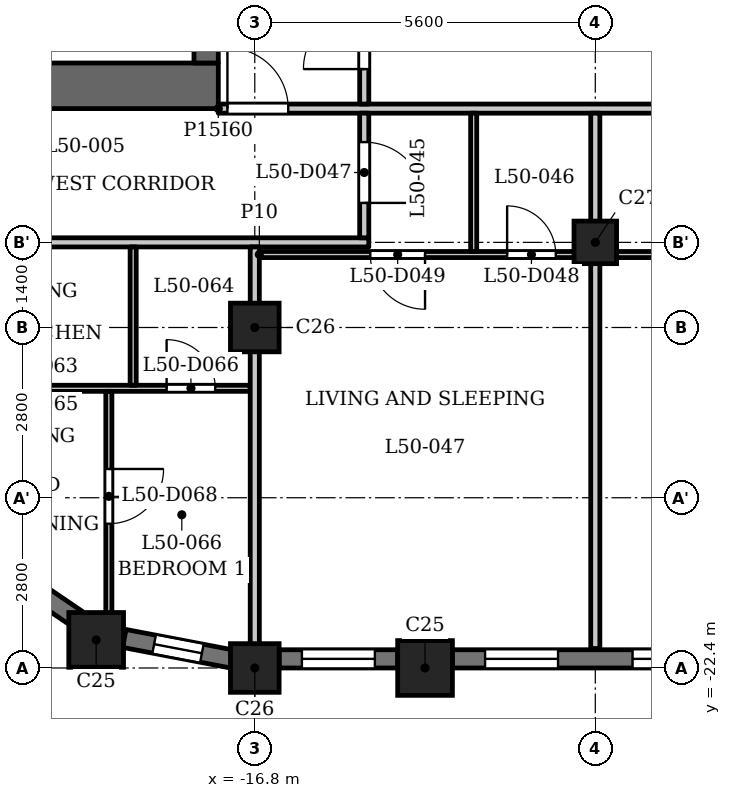
"""IFC4 building model, lengths in metres.
Left out: names, types, materials, properties, quantities, classifications, styles, units other than length and angle.
Written with IfcOpenShell. Run it as: python <this file> out.ifc"""

import sys

from ifc_helpers import new_model, si_unit, direction, frame, frame_2d, origin, origin_2d, place, context, subcontext, project, spatial, rectangle, extrude, element, fill, save


model = new_model("IFC4")
c1 = context("Model", 3, precision=1e-05, world=origin(), true_north=direction((0.0, 1.0)))
c2 = subcontext(c1, "Body", "Model", "MODEL_VIEW")
j1 = project(units=[si_unit("LENGTHUNIT", "METRE"), si_unit("PLANEANGLEUNIT", "RADIAN")], contexts=[c1])
p1 = place(None, origin())
s1 = spatial("IfcSite", under=j1, at=p1, CompositionType="ELEMENT")
p2 = place(p1, origin())
s2 = spatial("IfcBuilding", under=s1, at=p2, CompositionType="ELEMENT")
p3 = place(p2, frame((0.0, 0.0, 195.9)))
s3 = spatial("IfcBuildingStorey", under=s2, at=p3, CompositionType="ELEMENT", Elevation=195.9)
for number, where, z_axis, x_axis in (
    (1, (-19.409, -21.938, 0.0), (0.0, 0.0, 1.0), (1.0, 0.0, 0.0)),
    (2, (-14.0, -22.4, 0.0), (0.0, 0.0, 1.0), (1.0, 0.0, 0.0)),
):
    element("IfcColumn", number, at=place(p3, frame(where, z_axis=z_axis, x_axis=x_axis)), inside=s3, PredefinedType="COLUMN", context=c2, shape_type="SweptSolid", body=[
        extrude(rectangle(XDim=0.9, YDim=0.9, at=origin_2d()), origin(), (0.0, 0.0, 1.0), 3.5),
    ])
for number, where, z_axis, x_axis in (
    (3, (-16.8, -22.4, 0.0), (0.0, 0.0, 1.0), (1.0, 0.0, 0.0)),
    (4, (-16.8, -16.8, 0.0), (0.0, 0.0, 1.0), (1.0, 0.0, 0.0)),
):
    element("IfcColumn", number, at=place(p3, frame(where, z_axis=z_axis, x_axis=x_axis)), inside=s3, PredefinedType="COLUMN", context=c2, shape_type="SweptSolid", body=[
        extrude(rectangle(XDim=0.8, YDim=0.8, at=origin_2d()), origin(), (0.0, 0.0, 1.0), 3.5),
    ])
p4 = place(p3, frame((-11.2, -15.4, 0.0), z_axis=(0.0, 0.0, 1.0), x_axis=(1.0, 0.0, 0.0)))
e5 = element("IfcColumn", 5, at=p4, inside=s3, PredefinedType="COLUMN", context=c2, shape_type="SweptSolid", body=[
    extrude(rectangle(XDim=0.7, YDim=0.7, at=origin_2d()), origin(), (0.0, 0.0, 1.0), 3.5),
])
p5 = place(p3, frame((-20.775, -20.876, 0.0), z_axis=(0.0, 0.0, 1.0), x_axis=(0.827075824828, -0.562090366388, 0.0)))
e6 = element("IfcWall", 6, at=p5, inside=s3, PredefinedType="SOLIDWALL", context=c2, shape_type="SweptSolid", body=[
    extrude(rectangle(XDim=1.277, YDim=0.3, at=frame_2d((0.638, 0.0))), origin(), (0.0, 0.0, 1.0), 2.5),
])
p6 = place(p3, frame((-18.946, -21.914, 0.0), z_axis=(0.0, 0.0, 1.0), x_axis=(0.98230529033, -0.187286722942, 0.0)))
e7 = element("IfcWall", 7, at=p6, inside=s3, PredefinedType="SOLIDWALL", context=c2, shape_type="SweptSolid", body=[
    extrude(rectangle(XDim=1.799, YDim=0.3, at=frame_2d((0.899, 0.0))), origin(), (0.0, 0.0, 1.0), 2.5),
])
p7 = place(p6, frame((0.5, 0.0, 0.6)))
e8 = element("IfcOpeningElement", 8, at=p7, cuts=e7, PredefinedType="OPENING", context=c2, shape_type="SweptSolid", body=[
    extrude(rectangle(XDim=0.8, YDim=1.55, at=frame_2d((0.4, 0.775))), frame((0.0, 0.16, 0.0), z_axis=(0.0, -1.0, 0.0), x_axis=(1.0, 0.0, 0.0)), (0.0, 0.0, 1.0), 0.32),
])
p8 = place(p3, frame((-16.4, -22.25, 0.0), z_axis=(0.0, 0.0, 1.0), x_axis=(1.0, 0.0, 0.0)))
e9 = element("IfcWall", 9, at=p8, inside=s3, PredefinedType="SOLIDWALL", context=c2, shape_type="SweptSolid", body=[
    extrude(rectangle(XDim=1.95, YDim=0.3, at=frame_2d((0.975, 0.0))), origin(), (0.0, 0.0, 1.0), 2.5),
])
p9 = place(p8, frame((0.375, 0.0, 0.6)))
e10 = element("IfcOpeningElement", 10, at=p9, cuts=e9, PredefinedType="OPENING", context=c2, shape_type="SweptSolid", body=[
    extrude(rectangle(XDim=1.2, YDim=1.55, at=frame_2d((0.6, 0.775))), frame((0.0, 0.16, 0.0), z_axis=(0.0, -1.0, 0.0), x_axis=(1.0, 0.0, 0.0)), (0.0, 0.0, 1.0), 0.32),
])
p10 = place(p3, frame((-13.55, -22.25, 0.0), z_axis=(0.0, 0.0, 1.0), x_axis=(1.0, 0.0, 0.0)))
e11 = element("IfcWall", 11, at=p10, inside=s3, PredefinedType="SOLIDWALL", context=c2, shape_type="SweptSolid", body=[
    extrude(rectangle(XDim=4.7, YDim=0.3, at=frame_2d((2.35, 0.0))), origin(), (0.0, 0.0, 1.0), 2.5),
])
p11 = place(p10, frame((0.538, 0.0, 0.6)))
e12 = element("IfcOpeningElement", 12, at=p11, cuts=e11, PredefinedType="OPENING", context=c2, shape_type="SweptSolid", body=[
    extrude(rectangle(XDim=1.2, YDim=1.55, at=frame_2d((0.6, 0.775))), frame((0.0, 0.16, 0.0), z_axis=(0.0, -1.0, 0.0), x_axis=(1.0, 0.0, 0.0)), (0.0, 0.0, 1.0), 0.32),
])
p12 = place(p10, frame((2.962, 0.0, 0.6)))
e13 = element("IfcOpeningElement", 13, at=p12, cuts=e11, PredefinedType="OPENING", context=c2, shape_type="SweptSolid", body=[
    extrude(rectangle(XDim=1.2, YDim=1.55, at=frame_2d((0.6, 0.775))), frame((0.0, 0.16, 0.0), z_axis=(0.0, -1.0, 0.0), x_axis=(1.0, 0.0, 0.0)), (0.0, 0.0, 1.0), 0.32),
])
p13 = place(p3, frame((-17.4, -12.825, 0.0), z_axis=(0.0, 0.0, 1.0), x_axis=(-1.0, 0.0, 0.0)))
e14 = element("IfcWall", 14, at=p13, inside=s3, PredefinedType="SHEAR", context=c2, shape_type="SweptSolid", body=[
    extrude(rectangle(XDim=7.6, YDim=0.75, at=frame_2d((3.8, 0.0))), origin(), (0.0, 0.0, 1.0), 3.2),
])
p14 = place(p3, frame((-17.6, -12.45, 0.0), z_axis=(0.0, 0.0, 1.0), x_axis=(0.0, 1.0, 0.0)))
e15 = element("IfcWall", 15, at=p14, inside=s3, PredefinedType="SHEAR", context=c2, shape_type="SweptSolid", body=[
    extrude(rectangle(XDim=24.9, YDim=0.4, at=frame_2d((12.45, 0.0))), origin(), (0.0, 0.0, 1.0), 3.2),
])
p15 = place(p14, frame((6.325, 0.0, 0.0)))
e16 = element("IfcOpeningElement", 16, at=p15, cuts=e15, PredefinedType="OPENING", context=c2, shape_type="SweptSolid", body=[
    extrude(rectangle(XDim=0.9, YDim=2.1, at=frame_2d((0.45, 1.05))), frame((0.0, 0.21, 0.0), z_axis=(0.0, -1.0, 0.0), x_axis=(1.0, 0.0, 0.0)), (0.0, 0.0, 1.0), 0.42),
])
p16 = place(p14, frame((9.925, 0.0, 0.0)))
e17 = element("IfcOpeningElement", 17, at=p16, cuts=e15, PredefinedType="OPENING", context=c2, shape_type="SweptSolid", body=[
    extrude(rectangle(XDim=0.9, YDim=2.1, at=frame_2d((0.45, 1.05))), frame((0.0, 0.21, 0.0), z_axis=(0.0, -1.0, 0.0), x_axis=(1.0, 0.0, 0.0)), (0.0, 0.0, 1.0), 0.42),
])
p17 = place(p14, frame((15.6, 0.0, 0.0)))
e18 = element("IfcOpeningElement", 18, at=p17, cuts=e15, PredefinedType="OPENING", context=c2, shape_type="SweptSolid", body=[
    extrude(rectangle(XDim=1.1, YDim=2.1, at=frame_2d((0.55, 1.05))), frame((0.0, 0.21, 0.0), z_axis=(0.0, -1.0, 0.0), x_axis=(1.0, 0.0, 0.0)), (0.0, 0.0, 1.0), 0.42),
])
p18 = place(p14, frame((18.0, 0.0, 0.0)))
e19 = element("IfcOpeningElement", 19, at=p18, cuts=e15, PredefinedType="OPENING", context=c2, shape_type="SweptSolid", body=[
    extrude(rectangle(XDim=1.1, YDim=2.1, at=frame_2d((0.55, 1.05))), frame((0.0, 0.21, 0.0), z_axis=(0.0, -1.0, 0.0), x_axis=(1.0, 0.0, 0.0)), (0.0, 0.0, 1.0), 0.42),
])
p19 = place(p14, frame((23.025, 0.0, 0.0)))
e20 = element("IfcOpeningElement", 20, at=p19, cuts=e15, PredefinedType="OPENING", context=c2, shape_type="SweptSolid", body=[
    extrude(rectangle(XDim=1.1, YDim=2.1, at=frame_2d((0.55, 1.05))), frame((0.0, 0.21, 0.0), z_axis=(0.0, -1.0, 0.0), x_axis=(1.0, 0.0, 0.0)), (0.0, 0.0, 1.0), 0.42),
])
p20 = place(p14, frame((0.775, 0.0, 0.0)))
e21 = element("IfcOpeningElement", 21, at=p20, cuts=e15, PredefinedType="OPENING", context=c2, shape_type="SweptSolid", body=[
    extrude(rectangle(XDim=1.1, YDim=2.1, at=frame_2d((0.55, 1.05))), frame((0.0, 0.21, 0.0), z_axis=(0.0, -1.0, 0.0), x_axis=(1.0, 0.0, 0.0)), (0.0, 0.0, 1.0), 0.42),
])
p21 = place(p14, frame((12.925, 0.0, 0.0)))
e22 = element("IfcOpeningElement", 22, at=p21, cuts=e15, PredefinedType="OPENING", context=c2, shape_type="SweptSolid", body=[
    extrude(rectangle(XDim=1.8, YDim=2.1, at=frame_2d((0.9, 1.05))), frame((0.0, 0.21, 0.0), z_axis=(0.0, -1.0, 0.0), x_axis=(1.0, 0.0, 0.0)), (0.0, 0.0, 1.0), 0.42),
])
p22 = place(p3, frame((-23.594, -17.8, 0.0), z_axis=(0.0, 0.0, 1.0), x_axis=(1.0, 0.0, 0.0)))
e23 = element("IfcWall", 23, at=p22, inside=s3, PredefinedType="PARTITIONING", context=c2, shape_type="SweptSolid", body=[
    extrude(rectangle(XDim=6.719, YDim=0.1, at=frame_2d((3.359, 0.0))), origin(), (0.0, 0.0, 1.0), 3.2),
])
p23 = place(p22, frame((5.344, 0.0, 0.0)))
e24 = element("IfcOpeningElement", 24, at=p23, cuts=e23, PredefinedType="OPENING", context=c2, shape_type="SweptSolid", body=[
    extrude(rectangle(XDim=0.8, YDim=2.1, at=frame_2d((0.4, 1.05))), frame((0.0, 0.06, 0.0), z_axis=(0.0, -1.0, 0.0), x_axis=(1.0, 0.0, 0.0)), (0.0, 0.0, 1.0), 0.12),
])
p24 = place(p22, frame((1.126, 0.0, 0.0)))
e25 = element("IfcOpeningElement", 25, at=p24, cuts=e23, PredefinedType="OPENING", context=c2, shape_type="SweptSolid", body=[
    extrude(rectangle(XDim=0.9, YDim=2.1, at=frame_2d((0.45, 1.05))), frame((0.0, 0.06, 0.0), z_axis=(0.0, -1.0, 0.0), x_axis=(1.0, 0.0, 0.0)), (0.0, 0.0, 1.0), 0.12),
])
p25 = place(p3, frame((-16.725, -15.6, 0.0), z_axis=(0.0, 0.0, 1.0), x_axis=(1.0, 0.0, 0.0)))
e26 = element("IfcWall", 26, at=p25, inside=s3, PredefinedType="PARTITIONING", context=c2, shape_type="SweptSolid", body=[
    extrude(rectangle(XDim=33.45, YDim=0.1, at=frame_2d((16.725, 0.0))), origin(), (0.0, 0.0, 1.0), 3.2),
])
p26 = place(p25, frame((4.075, 0.0, 0.0)))
e27 = element("IfcOpeningElement", 27, at=p26, cuts=e26, PredefinedType="OPENING", context=c2, shape_type="SweptSolid", body=[
    extrude(rectangle(XDim=0.8, YDim=2.1, at=frame_2d((0.4, 1.05))), frame((0.0, 0.06, 0.0), z_axis=(0.0, -1.0, 0.0), x_axis=(1.0, 0.0, 0.0)), (0.0, 0.0, 1.0), 0.12),
])
p27 = place(p25, frame((1.825, 0.0, 0.0)))
e28 = element("IfcOpeningElement", 28, at=p27, cuts=e26, PredefinedType="OPENING", context=c2, shape_type="SweptSolid", body=[
    extrude(rectangle(XDim=0.9, YDim=2.1, at=frame_2d((0.45, 1.05))), frame((0.0, 0.06, 0.0), z_axis=(0.0, -1.0, 0.0), x_axis=(1.0, 0.0, 0.0)), (0.0, 0.0, 1.0), 0.12),
])
p28 = place(p25, frame((9.675, 0.0, 0.0)))
e29 = element("IfcOpeningElement", 29, at=p28, cuts=e26, PredefinedType="OPENING", context=c2, shape_type="SweptSolid", body=[
    extrude(rectangle(XDim=0.8, YDim=2.1, at=frame_2d((0.4, 1.05))), frame((0.0, 0.06, 0.0), z_axis=(0.0, -1.0, 0.0), x_axis=(1.0, 0.0, 0.0)), (0.0, 0.0, 1.0), 0.12),
])
p29 = place(p25, frame((14.025, 0.0, 0.0)))
e30 = element("IfcOpeningElement", 30, at=p29, cuts=e26, PredefinedType="OPENING", context=c2, shape_type="SweptSolid", body=[
    extrude(rectangle(XDim=0.9, YDim=2.1, at=frame_2d((0.45, 1.05))), frame((0.0, 0.06, 0.0), z_axis=(0.0, -1.0, 0.0), x_axis=(1.0, 0.0, 0.0)), (0.0, 0.0, 1.0), 0.12),
])
p30 = place(p25, frame((20.875, 0.0, 0.0)))
e31 = element("IfcOpeningElement", 31, at=p30, cuts=e26, PredefinedType="OPENING", context=c2, shape_type="SweptSolid", body=[
    extrude(rectangle(XDim=0.8, YDim=2.1, at=frame_2d((0.4, 1.05))), frame((0.0, 0.06, 0.0), z_axis=(0.0, -1.0, 0.0), x_axis=(1.0, 0.0, 0.0)), (0.0, 0.0, 1.0), 0.12),
])
p31 = place(p25, frame((25.225, 0.0, 0.0)))
e32 = element("IfcOpeningElement", 32, at=p31, cuts=e26, PredefinedType="OPENING", context=c2, shape_type="SweptSolid", body=[
    extrude(rectangle(XDim=0.9, YDim=2.1, at=frame_2d((0.45, 1.05))), frame((0.0, 0.06, 0.0), z_axis=(0.0, -1.0, 0.0), x_axis=(1.0, 0.0, 0.0)), (0.0, 0.0, 1.0), 0.12),
])
p32 = place(p25, frame((28.475, 0.0, 0.0)))
e33 = element("IfcOpeningElement", 33, at=p32, cuts=e26, PredefinedType="OPENING", context=c2, shape_type="SweptSolid", body=[
    extrude(rectangle(XDim=0.8, YDim=2.1, at=frame_2d((0.4, 1.05))), frame((0.0, 0.06, 0.0), z_axis=(0.0, -1.0, 0.0), x_axis=(1.0, 0.0, 0.0)), (0.0, 0.0, 1.0), 0.12),
])
p33 = place(p25, frame((30.675, 0.0, 0.0)))
e34 = element("IfcOpeningElement", 34, at=p33, cuts=e26, PredefinedType="OPENING", context=c2, shape_type="SweptSolid", body=[
    extrude(rectangle(XDim=0.9, YDim=2.1, at=frame_2d((0.45, 1.05))), frame((0.0, 0.06, 0.0), z_axis=(0.0, -1.0, 0.0), x_axis=(1.0, 0.0, 0.0)), (0.0, 0.0, 1.0), 0.12),
])
p34 = place(p3, frame((-24.684, -15.4, 0.0), z_axis=(0.0, 0.0, 1.0), x_axis=(1.0, 0.0, 0.0)))
e35 = element("IfcWall", 35, at=p34, inside=s3, PredefinedType="PARTITIONING", context=c2, shape_type="SweptSolid", body=[
    extrude(rectangle(XDim=9.759, YDim=0.15, at=frame_2d((4.879, 0.0))), origin(), (0.0, 0.0, 1.0), 3.2),
])
p35 = place(p34, frame((1.143, 0.0, 0.0)))
e36 = element("IfcOpeningElement", 36, at=p35, cuts=e35, PredefinedType="OPENING", context=c2, shape_type="SweptSolid", body=[
    extrude(rectangle(XDim=1.0, YDim=2.1, at=frame_2d((0.5, 1.05))), frame((0.0, 0.085, 0.0), z_axis=(0.0, -1.0, 0.0), x_axis=(1.0, 0.0, 0.0)), (0.0, 0.0, 1.0), 0.17),
])
p36 = place(p3, frame((-17.4, -13.2, 0.0), z_axis=(0.0, 0.0, 1.0), x_axis=(1.0, 0.0, 0.0)))
e37 = element("IfcWall", 37, at=p36, inside=s3, PredefinedType="PARTITIONING", context=c2, shape_type="SweptSolid", body=[
    extrude(rectangle(XDim=34.8, YDim=0.15, at=frame_2d((17.4, 0.0))), origin(), (0.0, 0.0, 1.0), 3.2),
])
p37 = place(p36, frame((0.15, 0.0, 0.0)))
e38 = element("IfcOpeningElement", 38, at=p37, cuts=e37, PredefinedType="OPENING", context=c2, shape_type="SweptSolid", body=[
    extrude(rectangle(XDim=1.0, YDim=2.1, at=frame_2d((0.5, 1.05))), frame((0.0, 0.085, 0.0), z_axis=(0.0, -1.0, 0.0), x_axis=(1.0, 0.0, 0.0)), (0.0, 0.0, 1.0), 0.17),
])
p38 = place(p36, frame((33.55, 0.0, 0.0)))
e39 = element("IfcOpeningElement", 39, at=p38, cuts=e37, PredefinedType="OPENING", context=c2, shape_type="SweptSolid", body=[
    extrude(rectangle(XDim=1.0, YDim=2.1, at=frame_2d((0.5, 1.05))), frame((0.0, 0.085, 0.0), z_axis=(0.0, -1.0, 0.0), x_axis=(1.0, 0.0, 0.0)), (0.0, 0.0, 1.0), 0.17),
])
p39 = place(p36, frame((15.7, 0.0, 0.0)))
e40 = element("IfcOpeningElement", 40, at=p39, cuts=e37, PredefinedType="OPENING", context=c2, shape_type="SweptSolid", body=[
    extrude(rectangle(XDim=1.0, YDim=2.1, at=frame_2d((0.5, 1.05))), frame((0.0, 0.085, 0.0), z_axis=(0.0, -1.0, 0.0), x_axis=(1.0, 0.0, 0.0)), (0.0, 0.0, 1.0), 0.17),
])
p40 = place(p36, frame((26.9, 0.0, 0.0)))
e41 = element("IfcOpeningElement", 41, at=p40, cuts=e37, PredefinedType="OPENING", context=c2, shape_type="SweptSolid", body=[
    extrude(rectangle(XDim=1.0, YDim=2.1, at=frame_2d((0.5, 1.05))), frame((0.0, 0.085, 0.0), z_axis=(0.0, -1.0, 0.0), x_axis=(1.0, 0.0, 0.0)), (0.0, 0.0, 1.0), 0.17),
])
p41 = place(p3, frame((-19.2, -21.92, 0.0), z_axis=(0.0, 0.0, 1.0), x_axis=(0.0, 1.0, 0.0)))
e42 = element("IfcWall", 42, at=p41, inside=s3, PredefinedType="PARTITIONING", context=c2, shape_type="SweptSolid", body=[
    extrude(rectangle(XDim=4.07, YDim=0.1, at=frame_2d((2.035, 0.0))), origin(), (0.0, 0.0, 1.0), 3.2),
])
p42 = place(p41, frame((1.893, 0.0, 0.0)))
e43 = element("IfcOpeningElement", 43, at=p42, cuts=e42, PredefinedType="OPENING", context=c2, shape_type="SweptSolid", body=[
    extrude(rectangle(XDim=0.9, YDim=2.1, at=frame_2d((0.45, 1.05))), frame((0.0, 0.06, 0.0), z_axis=(0.0, -1.0, 0.0), x_axis=(1.0, 0.0, 0.0)), (0.0, 0.0, 1.0), 0.12),
])
p43 = place(p3, frame((-18.8, -17.75, 0.0), z_axis=(0.0, 0.0, 1.0), x_axis=(0.0, 1.0, 0.0)))
e44 = element("IfcWall", 44, at=p43, inside=s3, PredefinedType="PARTITIONING", context=c2, shape_type="SweptSolid", body=[
    extrude(rectangle(XDim=2.275, YDim=0.1, at=frame_2d((1.137, 0.0))), origin(), (0.0, 0.0, 1.0), 3.2),
])
p44 = place(p3, frame((-16.8, -22.31, 0.0), z_axis=(0.0, 0.0, 1.0), x_axis=(0.0, 1.0, 0.0)))
e45 = element("IfcWall", 45, at=p44, inside=s3, PredefinedType="PARTITIONING", context=c2, shape_type="SweptSolid", body=[
    extrude(rectangle(XDim=6.835, YDim=0.15, at=frame_2d((3.417, 0.0))), origin(), (0.0, 0.0, 1.0), 2.55),
])
p45 = place(p3, frame((-15.0, -15.325, 0.0), z_axis=(0.0, 0.0, 1.0), x_axis=(0.0, 1.0, 0.0)))
e46 = element("IfcWall", 46, at=p45, inside=s3, PredefinedType="PARTITIONING", context=c2, shape_type="SweptSolid", body=[
    extrude(rectangle(XDim=2.05, YDim=0.15, at=frame_2d((1.025, 0.0))), origin(), (0.0, 0.0, 1.0), 3.2),
])
p46 = place(p45, frame((0.574, 0.0, 0.0)))
e47 = element("IfcOpeningElement", 47, at=p46, cuts=e46, PredefinedType="OPENING", context=c2, shape_type="SweptSolid", body=[
    extrude(rectangle(XDim=1.0, YDim=2.1, at=frame_2d((0.5, 1.05))), frame((0.0, 0.085, 0.0), z_axis=(0.0, -1.0, 0.0), x_axis=(1.0, 0.0, 0.0)), (0.0, 0.0, 1.0), 0.17),
])
p47 = place(p3, frame((-15.0, -13.125, 0.0), z_axis=(0.0, 0.0, 1.0), x_axis=(0.0, 1.0, 0.0)))
e48 = element("IfcWall", 48, at=p47, inside=s3, PredefinedType="PARTITIONING", context=c2, shape_type="SweptSolid", body=[
    extrude(rectangle(XDim=6.356, YDim=0.15, at=frame_2d((3.178, 0.0))), origin(), (0.0, 0.0, 1.0), 3.2),
])
p48 = place(p47, frame((0.575, 0.0, 0.0)))
e49 = element("IfcOpeningElement", 49, at=p48, cuts=e48, PredefinedType="OPENING", context=c2, shape_type="SweptSolid", body=[
    extrude(rectangle(XDim=1.0, YDim=2.1, at=frame_2d((0.5, 1.05))), frame((0.0, 0.085, 0.0), z_axis=(0.0, -1.0, 0.0), x_axis=(1.0, 0.0, 0.0)), (0.0, 0.0, 1.0), 0.17),
])
p49 = place(p3, frame((-13.2, -15.55, 0.0), z_axis=(0.0, 0.0, 1.0), x_axis=(0.0, 1.0, 0.0)))
e50 = element("IfcWall", 50, at=p49, inside=s3, PredefinedType="PARTITIONING", context=c2, shape_type="SweptSolid", body=[
    extrude(rectangle(XDim=2.275, YDim=0.1, at=frame_2d((1.138, 0.0))), origin(), (0.0, 0.0, 1.0), 3.2),
])
p50 = place(p3, frame((-11.2, -22.08, 0.0), z_axis=(0.0, 0.0, 1.0), x_axis=(0.0, 1.0, 0.0)))
e51 = element("IfcWall", 51, at=p50, inside=s3, PredefinedType="PARTITIONING", context=c2, shape_type="SweptSolid", body=[
    extrude(rectangle(XDim=6.43, YDim=0.15, at=frame_2d((3.215, 0.0))), origin(), (0.0, 0.0, 1.0), 3.2),
])
p51 = place(p3, frame((-11.2, -15.55, 0.0), z_axis=(0.0, 0.0, 1.0), x_axis=(0.0, 1.0, 0.0)))
e52 = element("IfcWall", 52, at=p51, inside=s3, PredefinedType="PARTITIONING", context=c2, shape_type="SweptSolid", body=[
    extrude(rectangle(XDim=2.275, YDim=0.15, at=frame_2d((1.138, 0.0))), origin(), (0.0, 0.0, 1.0), 3.2),
])
p52 = place(p48, origin())
e53 = element("IfcDoor", 53, at=p52, inside=s3, OperationType="SINGLE_SWING_RIGHT", PredefinedType="DOOR", context=c2, shape_type="SweptSolid", body=[
    extrude(rectangle(XDim=1.0, YDim=2.1, at=frame_2d((0.5, 1.05))), frame((0.0, 0.025, 0.0), z_axis=(0.0, -1.0, 0.0), x_axis=(1.0, 0.0, 0.0)), (0.0, 0.0, 1.0), 0.05),
])
fill(e49, e53)
p53 = place(p37, origin())
e54 = element("IfcDoor", 54, at=p53, inside=s3, OperationType="SINGLE_SWING_RIGHT", PredefinedType="DOOR", context=c2, shape_type="SweptSolid", body=[
    extrude(rectangle(XDim=1.0, YDim=2.1, at=frame_2d((0.5, 1.05))), frame((0.0, 0.025, 0.0), z_axis=(0.0, -1.0, 0.0), x_axis=(1.0, 0.0, 0.0)), (0.0, 0.0, 1.0), 0.05),
])
fill(e38, e54)
p54 = place(p46, origin())
e55 = element("IfcDoor", 55, at=p54, inside=s3, OperationType="SINGLE_SWING_LEFT", PredefinedType="DOOR", context=c2, shape_type="SweptSolid", body=[
    extrude(rectangle(XDim=1.0, YDim=2.1, at=frame_2d((0.5, 1.05))), frame((0.0, 0.025, 0.0), z_axis=(0.0, -1.0, 0.0), x_axis=(1.0, 0.0, 0.0)), (0.0, 0.0, 1.0), 0.05),
])
fill(e47, e55)
p55 = place(p26, origin())
e56 = element("IfcDoor", 56, at=p55, inside=s3, OperationType="SINGLE_SWING_RIGHT", PredefinedType="DOOR", context=c2, shape_type="SweptSolid", body=[
    extrude(rectangle(XDim=0.8, YDim=2.1, at=frame_2d((0.4, 1.05))), frame((0.0, 0.025, 0.0), z_axis=(0.0, -1.0, 0.0), x_axis=(1.0, 0.0, 0.0)), (0.0, 0.0, 1.0), 0.05),
])
fill(e27, e56)
p56 = place(p27, origin())
e57 = element("IfcDoor", 57, at=p56, inside=s3, OperationType="SINGLE_SWING_RIGHT", PredefinedType="DOOR", context=c2, shape_type="SweptSolid", body=[
    extrude(rectangle(XDim=0.9, YDim=2.1, at=frame_2d((0.45, 1.05))), frame((0.0, 0.025, 0.0), z_axis=(0.0, -1.0, 0.0), x_axis=(1.0, 0.0, 0.0)), (0.0, 0.0, 1.0), 0.05),
])
fill(e28, e57)
p57 = place(p23, origin())
e58 = element("IfcDoor", 58, at=p57, inside=s3, OperationType="SINGLE_SWING_RIGHT", PredefinedType="DOOR", context=c2, shape_type="SweptSolid", body=[
    extrude(rectangle(XDim=0.8, YDim=2.1, at=frame_2d((0.4, 1.05))), frame((0.0, 0.025, 0.0), z_axis=(0.0, -1.0, 0.0), x_axis=(1.0, 0.0, 0.0)), (0.0, 0.0, 1.0), 0.05),
])
fill(e24, e58)
p58 = place(p42, origin())
e59 = element("IfcDoor", 59, at=p58, inside=s3, OperationType="SINGLE_SWING_RIGHT", PredefinedType="DOOR", context=c2, shape_type="SweptSolid", body=[
    extrude(rectangle(XDim=0.9, YDim=2.1, at=frame_2d((0.45, 1.05))), frame((0.0, 0.025, 0.0), z_axis=(0.0, -1.0, 0.0), x_axis=(1.0, 0.0, 0.0)), (0.0, 0.0, 1.0), 0.05),
])
fill(e43, e59)
p59 = place(p7, origin())
e60 = element("IfcWindow", 60, at=p59, inside=s3, PartitioningType="SINGLE_PANEL", PredefinedType="WINDOW", context=c2, shape_type="SweptSolid", body=[
    extrude(rectangle(XDim=0.8, YDim=1.55, at=frame_2d((0.4, 0.775))), frame((0.0, 0.03, 0.0), z_axis=(0.0, -1.0, 0.0), x_axis=(1.0, 0.0, 0.0)), (0.0, 0.0, 1.0), 0.06),
])
fill(e8, e60)
p60 = place(p9, origin())
e61 = element("IfcWindow", 61, at=p60, inside=s3, PartitioningType="SINGLE_PANEL", PredefinedType="WINDOW", context=c2, shape_type="SweptSolid", body=[
    extrude(rectangle(XDim=1.2, YDim=1.55, at=frame_2d((0.6, 0.775))), frame((0.0, 0.03, 0.0), z_axis=(0.0, -1.0, 0.0), x_axis=(1.0, 0.0, 0.0)), (0.0, 0.0, 1.0), 0.06),
])
fill(e10, e61)
p61 = place(p11, origin())
e62 = element("IfcWindow", 62, at=p61, inside=s3, PartitioningType="SINGLE_PANEL", PredefinedType="WINDOW", context=c2, shape_type="SweptSolid", body=[
    extrude(rectangle(XDim=1.2, YDim=1.55, at=frame_2d((0.6, 0.775))), frame((0.0, 0.03, 0.0), z_axis=(0.0, -1.0, 0.0), x_axis=(1.0, 0.0, 0.0)), (0.0, 0.0, 1.0), 0.06),
])
fill(e12, e62)
p62 = place(p12, origin())
e63 = element("IfcWindow", 63, at=p62, inside=s3, PartitioningType="SINGLE_PANEL", PredefinedType="WINDOW", context=c2, shape_type="SweptSolid", body=[
    extrude(rectangle(XDim=1.2, YDim=1.55, at=frame_2d((0.6, 0.775))), frame((0.0, 0.03, 0.0), z_axis=(0.0, -1.0, 0.0), x_axis=(1.0, 0.0, 0.0)), (0.0, 0.0, 1.0), 0.06),
])
fill(e13, e63)
save(model, sys.argv[1])
